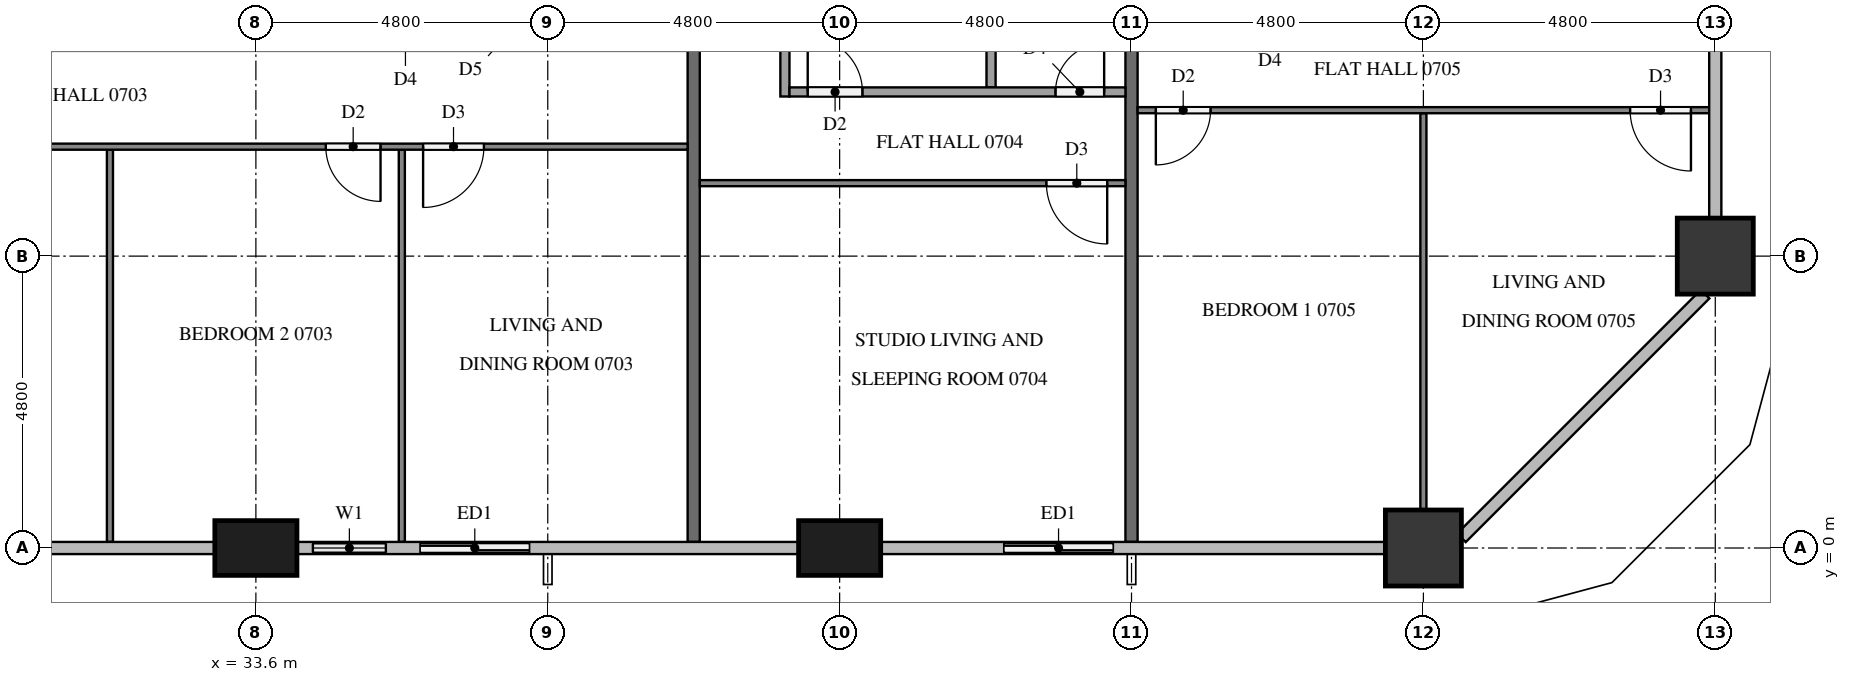
"""IFC4 building model, lengths in metres.
Left out: names, types, materials, properties, quantities, classifications, styles, units other than length and angle.
Written with IfcOpenShell. Run it as: python <this file> out.ifc"""

import sys

from ifc_helpers import new_model, si_unit, direction, frame, frame_2d, origin, origin_2d, place, context, subcontext, project, spatial, rectangle, extrude, element, fill, save


model = new_model("IFC4")
c1 = context("Model", 3, precision=1e-05, world=origin(), true_north=direction((0.0, 1.0)))
c2 = subcontext(c1, "Body", "Model", "MODEL_VIEW")
j1 = project(units=[si_unit("LENGTHUNIT", "METRE"), si_unit("PLANEANGLEUNIT", "RADIAN")], contexts=[c1])
p1 = place(None, origin())
s1 = spatial("IfcSite", under=j1, at=p1, CompositionType="ELEMENT")
p2 = place(p1, origin())
s2 = spatial("IfcBuilding", under=s1, at=p2, CompositionType="ELEMENT")
p3 = place(p2, frame((0.0, 0.0, 32.9)))
s3 = spatial("IfcBuildingStorey", under=s2, at=p3, CompositionType="ELEMENT", Elevation=32.9)
for number, where, z_axis, x_axis in (
    (1, (33.6, 0.0, 0.0), (0.0, 0.0, 1.0), (1.0, 0.0, 0.0)),
    (2, (43.2, 0.0, 0.0), (0.0, 0.0, 1.0), (1.0, 0.0, 0.0)),
):
    element("IfcColumn", number, at=place(p3, frame(where, z_axis=z_axis, x_axis=x_axis)), inside=s3, PredefinedType="COLUMN", context=c2, shape_type="SweptSolid", body=[
        extrude(rectangle(XDim=1.35, YDim=0.9, at=origin_2d()), origin(), (0.0, 0.0, 1.0), 3.2),
    ])
for number, where, z_axis, x_axis in (
    (3, (52.8, 0.0, 0.0), (0.0, 0.0, 1.0), (1.0, 0.0, 0.0)),
    (4, (57.6, 4.8, 0.0), (0.0, 0.0, 1.0), (1.0, 0.0, 0.0)),
):
    element("IfcColumn", number, at=place(p3, frame(where, z_axis=z_axis, x_axis=x_axis)), inside=s3, PredefinedType="COLUMN", context=c2, shape_type="SweptSolid", body=[
        extrude(rectangle(XDim=1.25, YDim=1.25, at=origin_2d()), origin(), (0.0, 0.0, 1.0), 3.2),
    ])
p4 = place(p3, frame((34.275, 0.0, 0.0), z_axis=(0.0, 0.0, 1.0), x_axis=(1.0, 0.0, 0.0)))
e5 = element("IfcWall", 5, at=p4, inside=s3, PredefinedType="SOLIDWALL", context=c2, shape_type="SweptSolid", body=[
    extrude(rectangle(XDim=4.125, YDim=0.15, at=frame_2d((2.062, 0.0))), origin(), (0.0, 0.0, 1.0), 3.2),
])
p5 = place(p4, frame((0.262, 0.0, 0.9)))
e6 = element("IfcOpeningElement", 6, at=p5, cuts=e5, PredefinedType="OPENING", context=c2, shape_type="SweptSolid", body=[
    extrude(rectangle(XDim=1.2, YDim=1.4, at=frame_2d((0.6, 0.7))), frame((0.0, 0.085, 0.0), z_axis=(0.0, -1.0, 0.0), x_axis=(1.0, 0.0, 0.0)), (0.0, 0.0, 1.0), 0.17),
])
p6 = place(p4, frame((2.025, 0.0, 0.0)))
e7 = element("IfcOpeningElement", 7, at=p6, cuts=e5, PredefinedType="OPENING", context=c2, shape_type="SweptSolid", body=[
    extrude(rectangle(XDim=1.8, YDim=2.4, at=frame_2d((0.9, 1.2))), frame((0.0, 0.085, 0.0), z_axis=(0.0, -1.0, 0.0), x_axis=(1.0, 0.0, 0.0)), (0.0, 0.0, 1.0), 0.17),
])
p7 = place(p3, frame((45.6, 0.0, 0.0), z_axis=(0.0, 0.0, 1.0), x_axis=(1.0, 0.0, 0.0)))
e8 = element("IfcWall", 8, at=p7, inside=s3, PredefinedType="SOLIDWALL", context=c2, shape_type="SweptSolid", body=[
    extrude(rectangle(XDim=2.4, YDim=0.15, at=frame_2d((1.2, 0.0))), origin(), (0.0, 0.0, 1.0), 3.2),
])
p8 = place(p7, frame((0.3, 0.0, 0.0)))
e9 = element("IfcOpeningElement", 9, at=p8, cuts=e8, PredefinedType="OPENING", context=c2, shape_type="SweptSolid", body=[
    extrude(rectangle(XDim=1.8, YDim=2.4, at=frame_2d((0.9, 1.2))), frame((0.0, 0.085, 0.0), z_axis=(0.0, -1.0, 0.0), x_axis=(1.0, 0.0, 0.0)), (0.0, 0.0, 1.0), 0.17),
])
for number, where, z_axis, x_axis in (
    (10, (40.8, 11.9, 0.0), (0.0, 0.0, 1.0), (0.0, -1.0, 0.0)),
    (11, (48.0, 11.9, 0.0), (0.0, 0.0, 1.0), (0.0, -1.0, 0.0)),
):
    element("IfcWall", number, at=place(p3, frame(where, z_axis=z_axis, x_axis=x_axis)), inside=s3, PredefinedType="PARTITIONING", context=c2, shape_type="SweptSolid", body=[
        extrude(rectangle(XDim=11.8, YDim=0.2, at=frame_2d((5.9, 0.0))), origin(), (0.0, 0.0, 1.0), 3.2),
    ])
for number, where, z_axis, x_axis in (
    (12, (31.2, 6.55, 0.0), (0.0, 0.0, 1.0), (0.0, -1.0, 0.0)),
    (13, (36.0, 6.55, 0.0), (0.0, 0.0, 1.0), (0.0, -1.0, 0.0)),
):
    element("IfcWall", number, at=place(p3, frame(where, z_axis=z_axis, x_axis=x_axis)), inside=s3, PredefinedType="PARTITIONING", context=c2, shape_type="SweptSolid", body=[
        extrude(rectangle(XDim=6.45, YDim=0.1, at=frame_2d((3.225, 0.0))), origin(), (0.0, 0.0, 1.0), 3.2),
    ])
p9 = place(p3, frame((40.7, 6.6, 0.0), z_axis=(0.0, 0.0, 1.0), x_axis=(-1.0, 0.0, 0.0)))
e14 = element("IfcWall", 14, at=p9, inside=s3, PredefinedType="PARTITIONING", context=c2, shape_type="SweptSolid", body=[
    extrude(rectangle(XDim=14.2, YDim=0.1, at=frame_2d((7.1, 0.0))), origin(), (0.0, 0.0, 1.0), 3.2),
])
p10 = place(p9, frame((13.0, 0.0, 0.0)))
e15 = element("IfcOpeningElement", 15, at=p10, cuts=e14, PredefinedType="OPENING", context=c2, shape_type="SweptSolid", body=[
    extrude(rectangle(XDim=0.9, YDim=2.1, at=frame_2d((0.45, 1.05))), frame((0.0, 0.06, 0.0), z_axis=(0.0, -1.0, 0.0), x_axis=(1.0, 0.0, 0.0)), (0.0, 0.0, 1.0), 0.12),
])
p11 = place(p9, frame((5.05, 0.0, 0.0)))
e16 = element("IfcOpeningElement", 16, at=p11, cuts=e14, PredefinedType="OPENING", context=c2, shape_type="SweptSolid", body=[
    extrude(rectangle(XDim=0.9, YDim=2.1, at=frame_2d((0.45, 1.05))), frame((0.0, 0.06, 0.0), z_axis=(0.0, -1.0, 0.0), x_axis=(1.0, 0.0, 0.0)), (0.0, 0.0, 1.0), 0.12),
])
p12 = place(p9, frame((3.35, 0.0, 0.0)))
e17 = element("IfcOpeningElement", 17, at=p12, cuts=e14, PredefinedType="OPENING", context=c2, shape_type="SweptSolid", body=[
    extrude(rectangle(XDim=1.0, YDim=2.1, at=frame_2d((0.5, 1.05))), frame((0.0, 0.06, 0.0), z_axis=(0.0, -1.0, 0.0), x_axis=(1.0, 0.0, 0.0)), (0.0, 0.0, 1.0), 0.12),
])
p13 = place(p3, frame((47.9, 6.0, 0.0), z_axis=(0.0, 0.0, 1.0), x_axis=(-1.0, 0.0, 0.0)))
e18 = element("IfcWall", 18, at=p13, inside=s3, PredefinedType="PARTITIONING", context=c2, shape_type="SweptSolid", body=[
    extrude(rectangle(XDim=7.0, YDim=0.1, at=frame_2d((3.5, 0.0))), origin(), (0.0, 0.0, 1.0), 3.2),
])
p14 = place(p13, frame((0.3, 0.0, 0.0)))
e19 = element("IfcOpeningElement", 19, at=p14, cuts=e18, PredefinedType="OPENING", context=c2, shape_type="SweptSolid", body=[
    extrude(rectangle(XDim=1.0, YDim=2.1, at=frame_2d((0.5, 1.05))), frame((0.0, 0.06, 0.0), z_axis=(0.0, -1.0, 0.0), x_axis=(1.0, 0.0, 0.0)), (0.0, 0.0, 1.0), 0.12),
])
p15 = place(p3, frame((45.69, 11.9, 0.0), z_axis=(0.0, 0.0, 1.0), x_axis=(0.0, -1.0, 0.0)))
e20 = element("IfcWall", 20, at=p15, inside=s3, PredefinedType="PARTITIONING", context=c2, shape_type="SweptSolid", body=[
    extrude(rectangle(XDim=4.325, YDim=0.15, at=frame_2d((2.163, 0.0))), origin(), (0.0, 0.0, 1.0), 3.2),
])
p16 = place(p3, frame((42.3, 11.9, 0.0), z_axis=(0.0, 0.0, 1.0), x_axis=(0.0, -1.0, 0.0)))
e21 = element("IfcWall", 21, at=p16, inside=s3, PredefinedType="PARTITIONING", context=c2, shape_type="SweptSolid", body=[
    extrude(rectangle(XDim=4.475, YDim=0.15, at=frame_2d((2.237, 0.0))), origin(), (0.0, 0.0, 1.0), 3.2),
])
p17 = place(p3, frame((42.375, 7.5, 0.0), z_axis=(0.0, 0.0, 1.0), x_axis=(1.0, 0.0, 0.0)))
e22 = element("IfcWall", 22, at=p17, inside=s3, PredefinedType="PARTITIONING", context=c2, shape_type="SweptSolid", body=[
    extrude(rectangle(XDim=5.525, YDim=0.15, at=frame_2d((2.762, 0.0))), origin(), (0.0, 0.0, 1.0), 3.2),
])
p18 = place(p17, frame((0.3, 0.0, 0.0)))
e23 = element("IfcOpeningElement", 23, at=p18, cuts=e22, PredefinedType="OPENING", context=c2, shape_type="SweptSolid", body=[
    extrude(rectangle(XDim=0.9, YDim=2.1, at=frame_2d((0.45, 1.05))), frame((0.0, 0.085, 0.0), z_axis=(0.0, -1.0, 0.0), x_axis=(1.0, 0.0, 0.0)), (0.0, 0.0, 1.0), 0.17),
])
p19 = place(p17, frame((4.375, 0.0, 0.0)))
e24 = element("IfcOpeningElement", 24, at=p19, cuts=e22, PredefinedType="OPENING", context=c2, shape_type="SweptSolid", body=[
    extrude(rectangle(XDim=0.8, YDim=2.1, at=frame_2d((0.4, 1.05))), frame((0.0, 0.085, 0.0), z_axis=(0.0, -1.0, 0.0), x_axis=(1.0, 0.0, 0.0)), (0.0, 0.0, 1.0), 0.17),
])
p20 = place(p3, frame((52.8, 7.15, 0.0), z_axis=(0.0, 0.0, 1.0), x_axis=(0.0, -1.0, 0.0)))
e25 = element("IfcWall", 25, at=p20, inside=s3, PredefinedType="PARTITIONING", context=c2, shape_type="SweptSolid", body=[
    extrude(rectangle(XDim=6.525, YDim=0.1, at=frame_2d((3.262, 0.0))), origin(), (0.0, 0.0, 1.0), 3.2),
])
p21 = place(p3, frame((57.5, 7.2, 0.0), z_axis=(0.0, 0.0, 1.0), x_axis=(-1.0, 0.0, 0.0)))
e26 = element("IfcWall", 26, at=p21, inside=s3, PredefinedType="PARTITIONING", context=c2, shape_type="SweptSolid", body=[
    extrude(rectangle(XDim=9.4, YDim=0.1, at=frame_2d((4.7, 0.0))), origin(), (0.0, 0.0, 1.0), 3.2),
])
p22 = place(p21, frame((8.2, 0.0, 0.0)))
e27 = element("IfcOpeningElement", 27, at=p22, cuts=e26, PredefinedType="OPENING", context=c2, shape_type="SweptSolid", body=[
    extrude(rectangle(XDim=0.9, YDim=2.1, at=frame_2d((0.45, 1.05))), frame((0.0, 0.06, 0.0), z_axis=(0.0, -1.0, 0.0), x_axis=(1.0, 0.0, 0.0)), (0.0, 0.0, 1.0), 0.12),
])
p23 = place(p21, frame((0.3, 0.0, 0.0)))
e28 = element("IfcOpeningElement", 28, at=p23, cuts=e26, PredefinedType="OPENING", context=c2, shape_type="SweptSolid", body=[
    extrude(rectangle(XDim=1.0, YDim=2.1, at=frame_2d((0.5, 1.05))), frame((0.0, 0.06, 0.0), z_axis=(0.0, -1.0, 0.0), x_axis=(1.0, 0.0, 0.0)), (0.0, 0.0, 1.0), 0.12),
])
p24 = place(p5, origin())
e29 = element("IfcWindow", 29, at=p24, inside=s3, PartitioningType="SINGLE_PANEL", PredefinedType="WINDOW", context=c2, shape_type="SweptSolid", body=[
    extrude(rectangle(XDim=1.2, YDim=1.4, at=frame_2d((0.6, 0.7))), frame((0.0, 0.03, 0.0), z_axis=(0.0, -1.0, 0.0), x_axis=(1.0, 0.0, 0.0)), (0.0, 0.0, 1.0), 0.06),
])
fill(e6, e29)
p25 = place(p6, origin())
e30 = element("IfcDoor", 30, at=p25, inside=s3, OperationType="SLIDING_TO_RIGHT", PredefinedType="DOOR", context=c2, shape_type="SweptSolid", body=[
    extrude(rectangle(XDim=1.8, YDim=2.4, at=frame_2d((0.9, 1.2))), frame((0.0, 0.025, 0.0), z_axis=(0.0, -1.0, 0.0), x_axis=(1.0, 0.0, 0.0)), (0.0, 0.0, 1.0), 0.05),
])
fill(e7, e30)
p26 = place(p8, origin())
e31 = element("IfcDoor", 31, at=p26, inside=s3, OperationType="SLIDING_TO_LEFT", PredefinedType="DOOR", context=c2, shape_type="SweptSolid", body=[
    extrude(rectangle(XDim=1.8, YDim=2.4, at=frame_2d((0.9, 1.2))), frame((0.0, 0.025, 0.0), z_axis=(0.0, -1.0, 0.0), x_axis=(1.0, 0.0, 0.0)), (0.0, 0.0, 1.0), 0.05),
])
fill(e9, e31)
p27 = place(p11, origin())
e32 = element("IfcDoor", 32, at=p27, inside=s3, OperationType="SINGLE_SWING_LEFT", PredefinedType="DOOR", context=c2, shape_type="SweptSolid", body=[
    extrude(rectangle(XDim=0.9, YDim=2.1, at=frame_2d((0.45, 1.05))), frame((0.0, 0.025, 0.0), z_axis=(0.0, -1.0, 0.0), x_axis=(1.0, 0.0, 0.0)), (0.0, 0.0, 1.0), 0.05),
])
fill(e16, e32)
p28 = place(p12, origin())
e33 = element("IfcDoor", 33, at=p28, inside=s3, OperationType="SINGLE_SWING_RIGHT", PredefinedType="DOOR", context=c2, shape_type="SweptSolid", body=[
    extrude(rectangle(XDim=1.0, YDim=2.1, at=frame_2d((0.5, 1.05))), frame((0.0, 0.025, 0.0), z_axis=(0.0, -1.0, 0.0), x_axis=(1.0, 0.0, 0.0)), (0.0, 0.0, 1.0), 0.05),
])
fill(e17, e33)
p29 = place(p14, origin())
e34 = element("IfcDoor", 34, at=p29, inside=s3, OperationType="SINGLE_SWING_LEFT", PredefinedType="DOOR", context=c2, shape_type="SweptSolid", body=[
    extrude(rectangle(XDim=1.0, YDim=2.1, at=frame_2d((0.5, 1.05))), frame((0.0, 0.025, 0.0), z_axis=(0.0, -1.0, 0.0), x_axis=(1.0, 0.0, 0.0)), (0.0, 0.0, 1.0), 0.05),
])
fill(e19, e34)
p30 = place(p18, origin())
e35 = element("IfcDoor", 35, at=p30, inside=s3, OperationType="SINGLE_SWING_LEFT", PredefinedType="DOOR", context=c2, shape_type="SweptSolid", body=[
    extrude(rectangle(XDim=0.9, YDim=2.1, at=frame_2d((0.45, 1.05))), frame((0.0, 0.025, 0.0), z_axis=(0.0, -1.0, 0.0), x_axis=(1.0, 0.0, 0.0)), (0.0, 0.0, 1.0), 0.05),
])
fill(e23, e35)
p31 = place(p19, origin())
e36 = element("IfcDoor", 36, at=p31, inside=s3, OperationType="SINGLE_SWING_RIGHT", PredefinedType="DOOR", context=c2, shape_type="SweptSolid", body=[
    extrude(rectangle(XDim=0.8, YDim=2.1, at=frame_2d((0.4, 1.05))), frame((0.0, 0.025, 0.0), z_axis=(0.0, -1.0, 0.0), x_axis=(1.0, 0.0, 0.0)), (0.0, 0.0, 1.0), 0.05),
])
fill(e24, e36)
p32 = place(p22, origin())
e37 = element("IfcDoor", 37, at=p32, inside=s3, OperationType="SINGLE_SWING_RIGHT", PredefinedType="DOOR", context=c2, shape_type="SweptSolid", body=[
    extrude(rectangle(XDim=0.9, YDim=2.1, at=frame_2d((0.45, 1.05))), frame((0.0, 0.025, 0.0), z_axis=(0.0, -1.0, 0.0), x_axis=(1.0, 0.0, 0.0)), (0.0, 0.0, 1.0), 0.05),
])
fill(e27, e37)
p33 = place(p23, origin())
e38 = element("IfcDoor", 38, at=p33, inside=s3, OperationType="SINGLE_SWING_LEFT", PredefinedType="DOOR", context=c2, shape_type="SweptSolid", body=[
    extrude(rectangle(XDim=1.0, YDim=2.1, at=frame_2d((0.5, 1.05))), frame((0.0, 0.025, 0.0), z_axis=(0.0, -1.0, 0.0), x_axis=(1.0, 0.0, 0.0)), (0.0, 0.0, 1.0), 0.05),
])
fill(e28, e38)
save(model, sys.argv[1])
